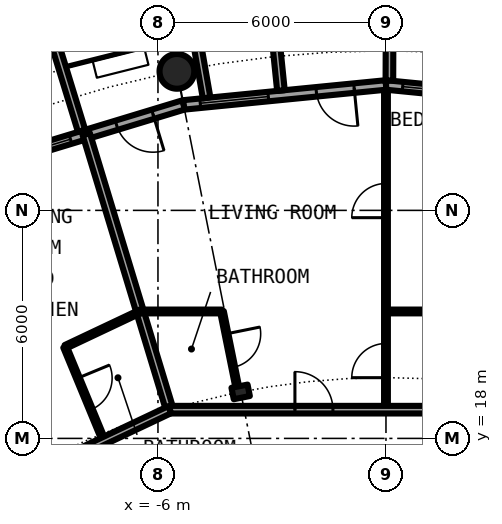
"""IFC4 building model, lengths in metres.
Left out: names, types, materials, properties, quantities, classifications, styles, units other than length and angle.
Written with IfcOpenShell. Run it as: python <this file> out.ifc"""

import sys

from ifc_helpers import new_model, si_unit, direction, frame, frame_2d, origin, origin_2d, place, context, subcontext, project, spatial, rectangle, circle, hollow_circle, i_section, extrude, element, fill, save


model = new_model("IFC4")
c1 = context("Model", 3, precision=1e-05, world=origin(), true_north=direction((0.0, 1.0)))
c2 = subcontext(c1, "Body", "Model", "MODEL_VIEW")
j1 = project(units=[si_unit("LENGTHUNIT", "METRE"), si_unit("PLANEANGLEUNIT", "RADIAN")], contexts=[c1])
p1 = place(None, origin())
s1 = spatial("IfcSite", under=j1, at=p1, CompositionType="ELEMENT")
p2 = place(p1, origin())
s2 = spatial("IfcBuilding", under=s1, at=p2, CompositionType="ELEMENT")
p3 = place(p2, frame((0.0, 0.0, 120.8)))
s3 = spatial("IfcBuildingStorey", under=s2, at=p3, CompositionType="ELEMENT", Elevation=120.8)
p4 = place(p3, frame((-5.501, 27.658, 0.0), z_axis=(0.0, 0.0, 1.0), x_axis=(1.0, 0.0, 0.0)))
e1 = element("IfcColumn", 1, at=p4, inside=s3, PredefinedType="COLUMN", context=c2, shape_type="SweptSolid", body=[
    extrude(hollow_circle(Radius=0.457, WallThickness=0.04, at=origin_2d()), origin(), (0.0, 0.0, 1.0), 3.05),
])
p5 = place(p3, frame((-3.824, 19.223, 0.0), z_axis=(0.0, 0.0, 1.0), x_axis=(-0.195090322016, 0.980785280403, 0.0)))
e2 = element("IfcColumn", 2, at=p5, inside=s3, PredefinedType="COLUMN", context=c2, shape_type="SweptSolid", body=[
    extrude(i_section(OverallWidth=0.307, OverallDepth=0.432, WebThickness=0.021, FlangeThickness=0.04, FilletRadius=0.027, at=origin_2d()), origin(), (0.0, 0.0, 1.0), 3.05),
])
p6 = place(p3, frame((5.326, 26.775, 0.0), z_axis=(0.0, 0.0, 1.0), x_axis=(-0.995173996315, 0.098126026407, 0.0)))
e3 = element("IfcWall", 3, at=p6, inside=s3, PredefinedType="SOLIDWALL", context=c2, shape_type="SweptSolid", body=[
    extrude(rectangle(XDim=5.352, YDim=0.25, at=frame_2d((2.676, 0.0))), origin(), (0.0, 0.0, 1.0), 2.7),
])
p7 = place(p6, frame((0.841, 0.0, 0.0)))
e4 = element("IfcOpeningElement", 4, at=p7, cuts=e3, PredefinedType="OPENING", context=c2, shape_type="SweptSolid", body=[
    extrude(rectangle(XDim=1.0, YDim=2.2, at=frame_2d((0.5, 1.1))), frame((0.0, 0.135, 0.0), z_axis=(0.0, -1.0, 0.0), x_axis=(1.0, 0.0, 0.0)), (0.0, 0.0, 1.0), 0.27),
])
p8 = place(p6, frame((3.111, 0.0, 0.3)))
e5 = element("IfcOpeningElement", 5, at=p8, cuts=e3, PredefinedType="OPENING", context=c2, shape_type="SweptSolid", body=[
    extrude(rectangle(XDim=1.8, YDim=2.1, at=frame_2d((0.9, 1.05))), frame((0.0, 0.135, 0.0), z_axis=(0.0, -1.0, 0.0), x_axis=(1.0, 0.0, 0.0)), (0.0, 0.0, 1.0), 0.27),
])
p9 = place(p3, frame((0.09, 27.417, -0.03), z_axis=(0.0, 0.0, 1.0), x_axis=(0.00347308367, 0.999993968827, 0.0)))
e6 = element("IfcWall", 6, at=p9, inside=s3, PredefinedType="SOLIDWALL", context=c2, shape_type="SweptSolid", body=[
    extrude(rectangle(XDim=2.882, YDim=0.2, at=frame_2d((1.441, 0.0))), origin(), (0.0, 0.0, 1.0), 2.73),
])
p10 = place(p3, frame((0.0, 27.3, 0.0), z_axis=(0.0, 0.0, 1.0), x_axis=(-0.995173996315, -0.098126026407, 0.0)))
e7 = element("IfcWall", 7, at=p10, inside=s3, PredefinedType="SOLIDWALL", context=c2, shape_type="SweptSolid", body=[
    extrude(rectangle(XDim=5.352, YDim=0.25, at=frame_2d((2.676, 0.0))), origin(), (0.0, 0.0, 1.0), 2.7),
])
p11 = place(p10, frame((0.841, 0.0, 0.0)))
e8 = element("IfcOpeningElement", 8, at=p11, cuts=e7, PredefinedType="OPENING", context=c2, shape_type="SweptSolid", body=[
    extrude(rectangle(XDim=1.0, YDim=2.2, at=frame_2d((0.5, 1.1))), frame((0.0, 0.135, 0.0), z_axis=(0.0, -1.0, 0.0), x_axis=(1.0, 0.0, 0.0)), (0.0, 0.0, 1.0), 0.27),
])
p12 = place(p10, frame((3.111, 0.0, 0.3)))
e9 = element("IfcOpeningElement", 9, at=p12, cuts=e7, PredefinedType="OPENING", context=c2, shape_type="SweptSolid", body=[
    extrude(rectangle(XDim=1.8, YDim=2.1, at=frame_2d((0.9, 1.05))), frame((0.0, 0.135, 0.0), z_axis=(0.0, -1.0, 0.0), x_axis=(1.0, 0.0, 0.0)), (0.0, 0.0, 1.0), 0.27),
])
p13 = place(p3, frame((-2.764, 27.153, -0.03), z_axis=(0.0, 0.0, 1.0), x_axis=(-0.101505487237, 0.994834979311, 0.0)))
e10 = element("IfcWall", 10, at=p13, inside=s3, PredefinedType="SOLIDWALL", context=c2, shape_type="SweptSolid", body=[
    extrude(rectangle(XDim=3.007, YDim=0.2, at=frame_2d((1.503, 0.0))), origin(), (0.0, 0.0, 1.0), 2.73),
])
p14 = place(p3, frame((-4.72, 26.961, -0.03), z_axis=(0.0, 0.0, 1.0), x_axis=(-0.172463232037, 0.98501595601, 0.0)))
e11 = element("IfcWall", 11, at=p14, inside=s3, PredefinedType="SOLIDWALL", context=c2, shape_type="SweptSolid", body=[
    extrude(rectangle(XDim=2.929, YDim=0.2, at=frame_2d((1.464, 0.0))), origin(), (0.0, 0.0, 1.0), 2.73),
])
p15 = place(p3, frame((-5.326, 26.775, 0.0), z_axis=(0.0, 0.0, 1.0), x_axis=(-0.956965678721, -0.290201119486, 0.0)))
e12 = element("IfcWall", 12, at=p15, inside=s3, PredefinedType="SOLIDWALL", context=c2, shape_type="SweptSolid", body=[
    extrude(rectangle(XDim=5.351, YDim=0.25, at=frame_2d((2.676, 0.0))), origin(), (0.0, 0.0, 1.0), 2.7),
])
p16 = place(p15, frame((0.841, 0.0, 0.0)))
e13 = element("IfcOpeningElement", 13, at=p16, cuts=e12, PredefinedType="OPENING", context=c2, shape_type="SweptSolid", body=[
    extrude(rectangle(XDim=1.0, YDim=2.2, at=frame_2d((0.5, 1.1))), frame((0.0, 0.135, 0.0), z_axis=(0.0, -1.0, 0.0), x_axis=(1.0, 0.0, 0.0)), (0.0, 0.0, 1.0), 0.27),
])
p17 = place(p15, frame((3.111, 0.0, 0.3)))
e14 = element("IfcOpeningElement", 14, at=p17, cuts=e12, PredefinedType="OPENING", context=c2, shape_type="SweptSolid", body=[
    extrude(rectangle(XDim=1.8, YDim=2.1, at=frame_2d((0.9, 1.05))), frame((0.0, 0.135, 0.0), z_axis=(0.0, -1.0, 0.0), x_axis=(1.0, 0.0, 0.0)), (0.0, 0.0, 1.0), 0.27),
])
p18 = place(p3, frame((-8.82, 29.093, -0.03), z_axis=(0.0, 0.0, 1.0), x_axis=(-0.941461077774, -0.337121697664, 0.0)))
e15 = element("IfcWall", 15, at=p18, inside=s3, PredefinedType="SOLIDWALL", context=c2, shape_type="SweptSolid", body=[
    extrude(rectangle(XDim=2.993, YDim=0.2, at=frame_2d((1.497, 0.0))), origin(), (0.0, 0.0, 1.0), 2.73),
])
p19 = place(p18, frame((0.457, 0.0, 0.33)))
e16 = element("IfcOpeningElement", 16, at=p19, cuts=e15, PredefinedType="OPENING", context=c2, shape_type="SweptSolid", body=[
    extrude(circle(Radius=1.04, at=frame_2d((1.04, 1.04))), frame((0.0, 0.11, 0.0), z_axis=(0.0, -1.0, 0.0), x_axis=(1.0, 0.0, 0.0)), (0.0, 0.0, 1.0), 0.22),
])
p20 = place(p3, frame((-8.009, 26.092, -0.03), z_axis=(0.0, 0.0, 1.0), x_axis=(-0.293406695073, 0.955987715029, 0.0)))
e17 = element("IfcWall", 17, at=p20, inside=s3, PredefinedType="SOLIDWALL", context=c2, shape_type="SweptSolid", body=[
    extrude(rectangle(XDim=3.006, YDim=0.2, at=frame_2d((1.503, 0.0))), origin(), (0.0, 0.0, 1.0), 2.73),
])
p21 = place(p3, frame((-7.887, 26.005, 0.0), z_axis=(0.0, 0.0, 1.0), x_axis=(0.29005838641, -0.957008951094, 0.0)))
e18 = element("IfcWall", 18, at=p21, inside=s3, PredefinedType="PARTITIONING", context=c2, shape_type="SweptSolid", body=[
    extrude(rectangle(XDim=7.574, YDim=0.2, at=frame_2d((3.787, 0.0))), origin(), (0.0, 0.0, 1.0), 2.7),
])
p22 = place(p3, frame((-8.445, 20.407, 0.0), z_axis=(0.0, 0.0, 1.0), x_axis=(0.382195876364, -0.924081334132, 0.0)))
e19 = element("IfcWall", 19, at=p22, inside=s3, PredefinedType="PARTITIONING", context=c2, shape_type="SweptSolid", body=[
    extrude(rectangle(XDim=2.674, YDim=0.1, at=frame_2d((1.337, 0.0))), origin(), (0.0, 0.0, 1.0), 2.7),
])
p23 = place(p22, frame((0.887, 0.0, 0.0)))
e20 = element("IfcOpeningElement", 20, at=p23, cuts=e19, PredefinedType="OPENING", context=c2, shape_type="SweptSolid", body=[
    extrude(rectangle(XDim=0.9, YDim=2.3, at=frame_2d((0.45, 1.15))), frame((0.0, 0.06, 0.0), z_axis=(0.0, -1.0, 0.0), x_axis=(1.0, 0.0, 0.0)), (0.0, 0.0, 1.0), 0.12),
])
p24 = place(p3, frame((-4.316, 21.34, 0.0), z_axis=(0.0, 0.0, 1.0), x_axis=(0.198348087074, -0.980131642359, 0.0)))
e21 = element("IfcWall", 21, at=p24, inside=s3, PredefinedType="PARTITIONING", context=c2, shape_type="SweptSolid", body=[
    extrude(rectangle(XDim=1.956, YDim=0.1, at=frame_2d((0.978, 0.0))), origin(), (0.0, 0.0, 1.0), 2.7),
])
p25 = place(p24, frame((0.6, 0.0, 0.0)))
e22 = element("IfcOpeningElement", 22, at=p25, cuts=e21, PredefinedType="OPENING", context=c2, shape_type="SweptSolid", body=[
    extrude(rectangle(XDim=0.9, YDim=2.3, at=frame_2d((0.45, 1.15))), frame((0.0, 0.06, 0.0), z_axis=(0.0, -1.0, 0.0), x_axis=(1.0, 0.0, 0.0)), (0.0, 0.0, 1.0), 0.12),
])
p26 = place(p3, frame((0.0, 18.756, 0.0), z_axis=(0.0, 0.0, 1.0), x_axis=(0.0, 1.0, 0.0)))
e23 = element("IfcWall", 23, at=p26, inside=s3, PredefinedType="PARTITIONING", context=c2, shape_type="SweptSolid", body=[
    extrude(rectangle(XDim=8.419, YDim=0.1, at=frame_2d((4.209, 0.0))), origin(), (0.0, 0.0, 1.0), 2.7),
])
p27 = place(p26, frame((0.842, 0.0, 0.0)))
e24 = element("IfcOpeningElement", 24, at=p27, cuts=e23, PredefinedType="OPENING", context=c2, shape_type="SweptSolid", body=[
    extrude(rectangle(XDim=0.9, YDim=2.3, at=frame_2d((0.45, 1.15))), frame((0.0, 0.06, 0.0), z_axis=(0.0, -1.0, 0.0), x_axis=(1.0, 0.0, 0.0)), (0.0, 0.0, 1.0), 0.12),
])
p28 = place(p26, frame((5.052, 0.0, 0.0)))
e25 = element("IfcOpeningElement", 25, at=p28, cuts=e23, PredefinedType="OPENING", context=c2, shape_type="SweptSolid", body=[
    extrude(rectangle(XDim=0.9, YDim=2.3, at=frame_2d((0.45, 1.15))), frame((0.0, 0.06, 0.0), z_axis=(0.0, -1.0, 0.0), x_axis=(1.0, 0.0, 0.0)), (0.0, 0.0, 1.0), 0.12),
])
p29 = place(p3, frame((-5.69, 18.756, 0.0), z_axis=(0.0, 0.0, 1.0), x_axis=(1.0, 0.0, 0.0)))
e26 = element("IfcWall", 26, at=p29, inside=s3, PredefinedType="PARTITIONING", context=c2, shape_type="SweptSolid", body=[
    extrude(rectangle(XDim=11.38, YDim=0.2, at=frame_2d((5.69, 0.0))), origin(), (0.0, 0.0, 1.0), 2.7),
])
p30 = place(p29, frame((3.294, 0.0, 0.0)))
e27 = element("IfcOpeningElement", 27, at=p30, cuts=e26, PredefinedType="OPENING", context=c2, shape_type="SweptSolid", body=[
    extrude(rectangle(XDim=1.0, YDim=2.3, at=frame_2d((0.5, 1.15))), frame((0.0, 0.11, 0.0), z_axis=(0.0, -1.0, 0.0), x_axis=(1.0, 0.0, 0.0)), (0.0, 0.0, 1.0), 0.22),
])
p31 = place(p3, frame((-10.748, 16.362, 0.0), z_axis=(0.0, 0.0, 1.0), x_axis=(0.903869270233, 0.427808768409, 0.0)))
e28 = element("IfcWall", 28, at=p31, inside=s3, PredefinedType="PARTITIONING", context=c2, shape_type="SweptSolid", body=[
    extrude(rectangle(XDim=5.596, YDim=0.2, at=frame_2d((2.798, 0.0))), origin(), (0.0, 0.0, 1.0), 2.39),
])
p32 = place(p31, frame((1.262, 0.0, 0.0)))
e29 = element("IfcOpeningElement", 29, at=p32, cuts=e28, PredefinedType="OPENING", context=c2, shape_type="SweptSolid", body=[
    extrude(rectangle(XDim=1.0, YDim=2.3, at=frame_2d((0.5, 1.15))), frame((0.0, 0.11, 0.0), z_axis=(0.0, -1.0, 0.0), x_axis=(1.0, 0.0, 0.0)), (0.0, 0.0, 1.0), 0.22),
])
p33 = place(p3, frame((-6.473, 21.34, 0.0), z_axis=(0.0, 0.0, 1.0), x_axis=(1.0, 0.0, 0.0)))
e30 = element("IfcWall", 30, at=p33, inside=s3, PredefinedType="PARTITIONING", context=c2, shape_type="SweptSolid", body=[
    extrude(rectangle(XDim=2.157, YDim=0.1, at=frame_2d((1.079, 0.0))), origin(), (0.0, 0.0, 1.0), 2.7),
])
p34 = place(p3, frame((0.0, 21.34, 0.0), z_axis=(0.0, 0.0, 1.0), x_axis=(1.0, 0.0, 0.0)))
e31 = element("IfcWall", 31, at=p34, inside=s3, PredefinedType="PARTITIONING", context=c2, shape_type="SweptSolid", body=[
    extrude(rectangle(XDim=6.473, YDim=0.1, at=frame_2d((3.236, 0.0))), origin(), (0.0, 0.0, 1.0), 2.7),
])
p35 = place(p3, frame((-8.436, 20.41, 0.0), z_axis=(0.0, 0.0, 1.0), x_axis=(0.904081702397, 0.427359655782, 0.0)))
e32 = element("IfcWall", 32, at=p35, inside=s3, PredefinedType="PARTITIONING", context=c2, shape_type="SweptSolid", body=[
    extrude(rectangle(XDim=2.181, YDim=0.1, at=frame_2d((1.091, 0.0))), origin(), (0.0, 0.0, 1.0), 2.7),
])
p36 = place(p8, origin())
e33 = element("IfcWindow", 33, at=p36, inside=s3, PartitioningType="SINGLE_PANEL", PredefinedType="WINDOW", context=c2, shape_type="SweptSolid", body=[
    extrude(rectangle(XDim=1.8, YDim=2.1, at=frame_2d((0.9, 1.05))), frame((0.0, 0.03, 0.0), z_axis=(0.0, -1.0, 0.0), x_axis=(1.0, 0.0, 0.0)), (0.0, 0.0, 1.0), 0.06),
])
fill(e5, e33)
p37 = place(p11, origin())
e34 = element("IfcDoor", 34, at=p37, inside=s3, OperationType="SINGLE_SWING_LEFT", PredefinedType="DOOR", context=c2, shape_type="SweptSolid", body=[
    extrude(rectangle(XDim=1.0, YDim=2.2, at=frame_2d((0.5, 1.1))), frame((0.0, 0.025, 0.0), z_axis=(0.0, -1.0, 0.0), x_axis=(1.0, 0.0, 0.0)), (0.0, 0.0, 1.0), 0.05),
])
fill(e8, e34)
p38 = place(p12, origin())
e35 = element("IfcWindow", 35, at=p38, inside=s3, PartitioningType="SINGLE_PANEL", PredefinedType="WINDOW", context=c2, shape_type="SweptSolid", body=[
    extrude(rectangle(XDim=1.8, YDim=2.1, at=frame_2d((0.9, 1.05))), frame((0.0, 0.03, 0.0), z_axis=(0.0, -1.0, 0.0), x_axis=(1.0, 0.0, 0.0)), (0.0, 0.0, 1.0), 0.06),
])
fill(e9, e35)
p39 = place(p16, origin())
e36 = element("IfcDoor", 36, at=p39, inside=s3, OperationType="SINGLE_SWING_LEFT", PredefinedType="DOOR", context=c2, shape_type="SweptSolid", body=[
    extrude(rectangle(XDim=1.0, YDim=2.2, at=frame_2d((0.5, 1.1))), frame((0.0, 0.025, 0.0), z_axis=(0.0, -1.0, 0.0), x_axis=(1.0, 0.0, 0.0)), (0.0, 0.0, 1.0), 0.05),
])
fill(e13, e36)
p40 = place(p17, origin())
e37 = element("IfcWindow", 37, at=p40, inside=s3, PartitioningType="SINGLE_PANEL", PredefinedType="WINDOW", context=c2, shape_type="SweptSolid", body=[
    extrude(rectangle(XDim=1.8, YDim=2.1, at=frame_2d((0.9, 1.05))), frame((0.0, 0.03, 0.0), z_axis=(0.0, -1.0, 0.0), x_axis=(1.0, 0.0, 0.0)), (0.0, 0.0, 1.0), 0.06),
])
fill(e14, e37)
p41 = place(p30, origin())
e38 = element("IfcDoor", 38, at=p41, inside=s3, OperationType="SINGLE_SWING_LEFT", PredefinedType="DOOR", context=c2, shape_type="SweptSolid", body=[
    extrude(rectangle(XDim=1.0, YDim=2.3, at=frame_2d((0.5, 1.15))), frame((0.0, 0.025, 0.0), z_axis=(0.0, -1.0, 0.0), x_axis=(1.0, 0.0, 0.0)), (0.0, 0.0, 1.0), 0.05),
])
fill(e27, e38)
p42 = place(p25, origin())
e39 = element("IfcDoor", 39, at=p42, inside=s3, OperationType="SINGLE_SWING_RIGHT", PredefinedType="DOOR", context=c2, shape_type="SweptSolid", body=[
    extrude(rectangle(XDim=0.9, YDim=2.3, at=frame_2d((0.45, 1.15))), frame((0.0, 0.025, 0.0), z_axis=(0.0, -1.0, 0.0), x_axis=(1.0, 0.0, 0.0)), (0.0, 0.0, 1.0), 0.05),
])
fill(e22, e39)
p43 = place(p27, origin())
e40 = element("IfcDoor", 40, at=p43, inside=s3, OperationType="SINGLE_SWING_LEFT", PredefinedType="DOOR", context=c2, shape_type="SweptSolid", body=[
    extrude(rectangle(XDim=0.9, YDim=2.3, at=frame_2d((0.45, 1.15))), frame((0.0, 0.025, 0.0), z_axis=(0.0, -1.0, 0.0), x_axis=(1.0, 0.0, 0.0)), (0.0, 0.0, 1.0), 0.05),
])
fill(e24, e40)
p44 = place(p28, origin())
e41 = element("IfcDoor", 41, at=p44, inside=s3, OperationType="SINGLE_SWING_RIGHT", PredefinedType="DOOR", context=c2, shape_type="SweptSolid", body=[
    extrude(rectangle(XDim=0.9, YDim=2.3, at=frame_2d((0.45, 1.15))), frame((0.0, 0.025, 0.0), z_axis=(0.0, -1.0, 0.0), x_axis=(1.0, 0.0, 0.0)), (0.0, 0.0, 1.0), 0.05),
])
fill(e25, e41)
p45 = place(p23, origin())
e42 = element("IfcDoor", 42, at=p45, inside=s3, OperationType="SINGLE_SWING_RIGHT", PredefinedType="DOOR", context=c2, shape_type="SweptSolid", body=[
    extrude(rectangle(XDim=0.9, YDim=2.3, at=frame_2d((0.45, 1.15))), frame((0.0, 0.025, 0.0), z_axis=(0.0, -1.0, 0.0), x_axis=(1.0, 0.0, 0.0)), (0.0, 0.0, 1.0), 0.05),
])
fill(e20, e42)
save(model, sys.argv[1])
